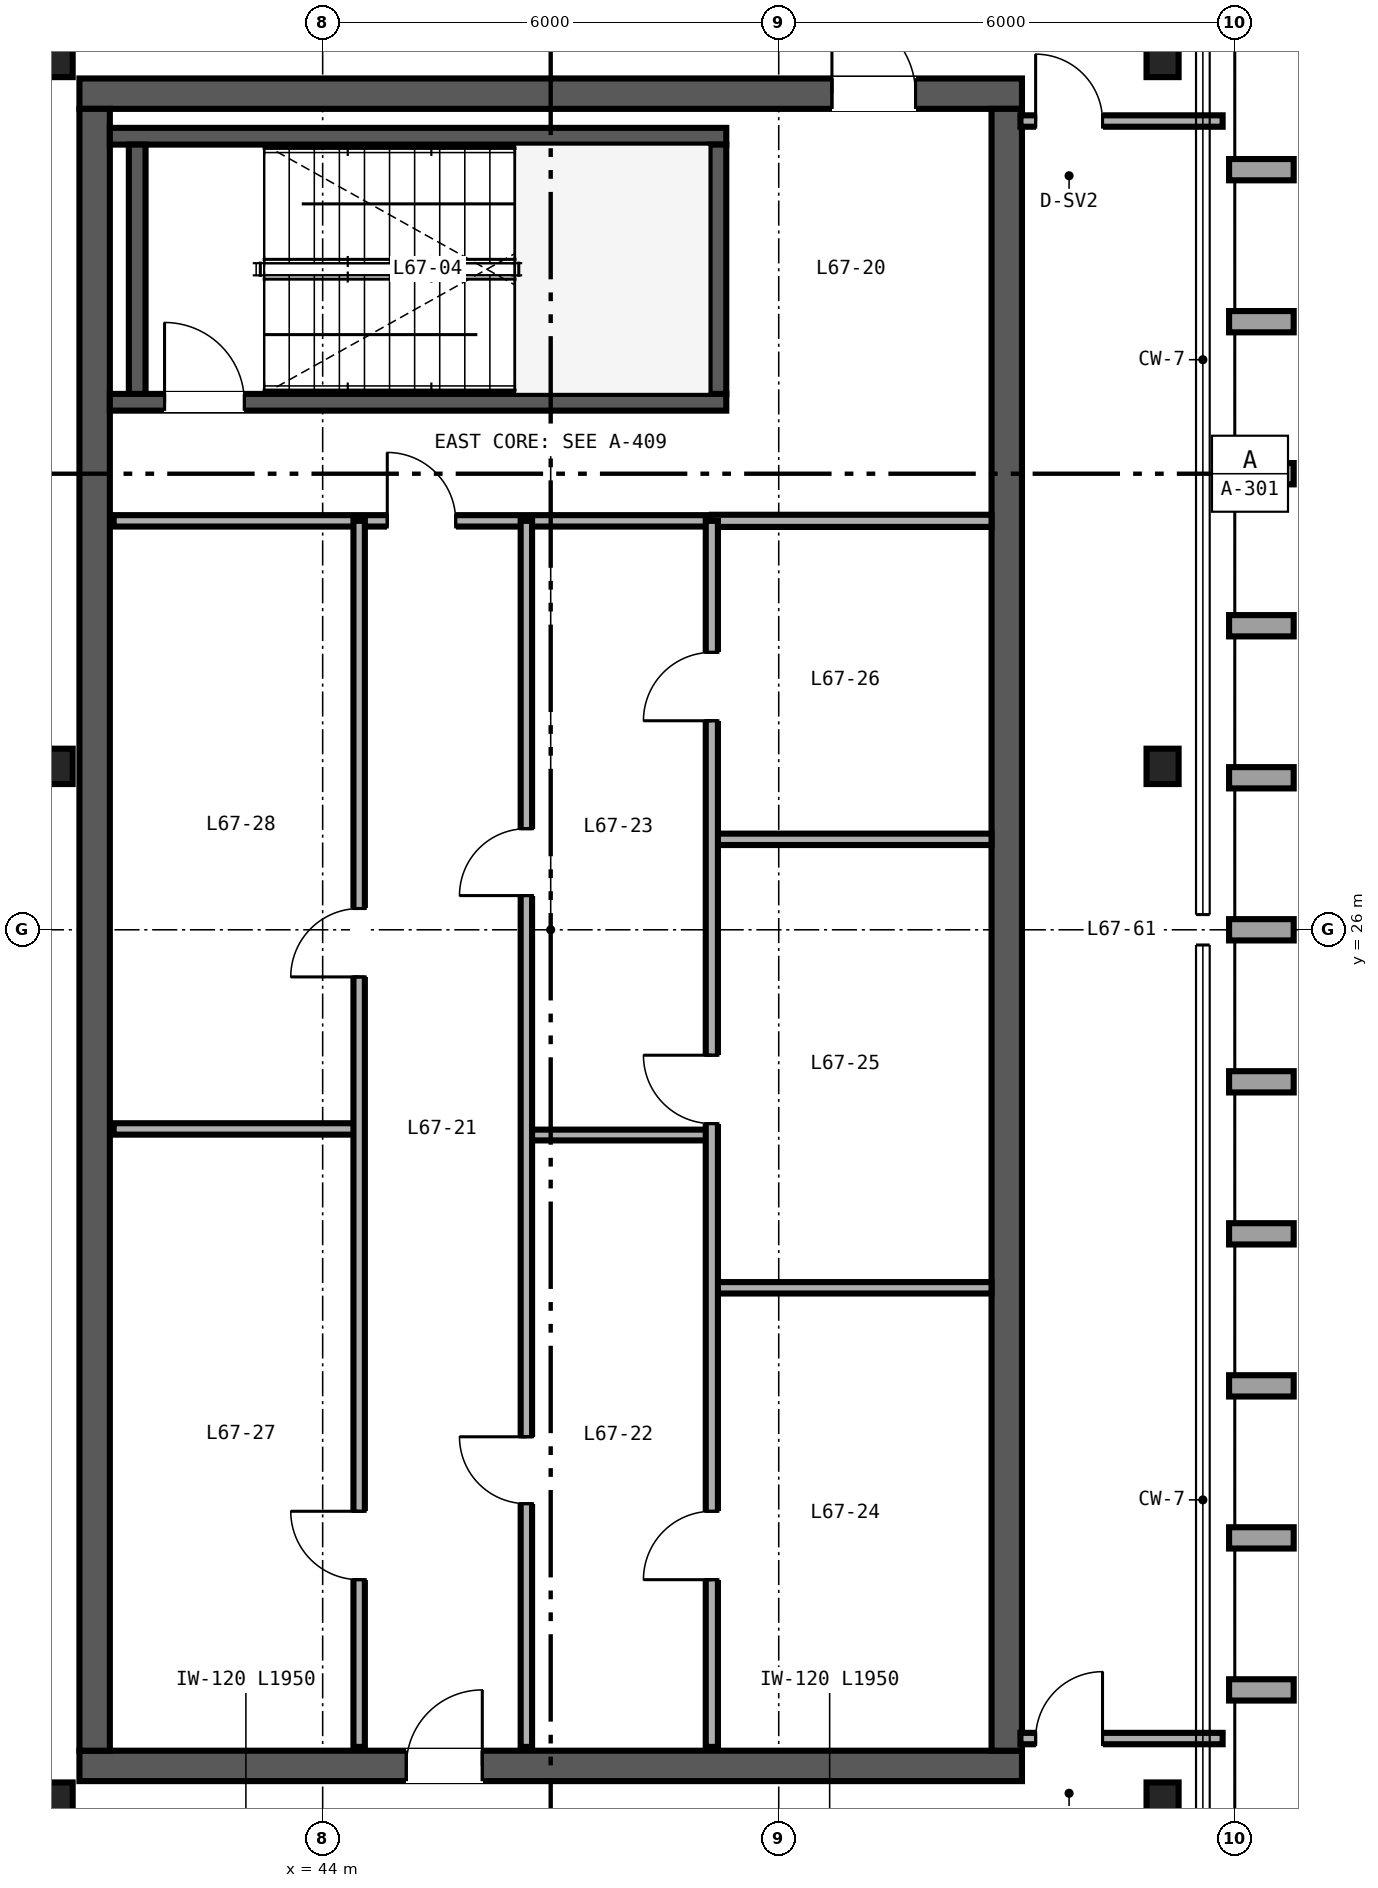
"""IFC4 building model, lengths in metres.
Left out: names, types, materials, properties, quantities, classifications, styles, units other than length and angle.
Written with IfcOpenShell. Run it as: python <this file> out.ifc"""

import sys

from ifc_helpers import new_model, si_unit, direction, frame, frame_2d, origin, origin_2d, place, context, subcontext, project, spatial, rectangle, i_section, extrude, source, transform, mapped, element, fill, save


model = new_model("IFC4")
c1 = context("Model", 3, precision=1e-05, world=origin(), true_north=direction((0.0, 1.0)))
c2 = subcontext(c1, "Body", "Model", "MODEL_VIEW")
j1 = project(units=[si_unit("LENGTHUNIT", "METRE"), si_unit("PLANEANGLEUNIT", "RADIAN")], contexts=[c1])
p1 = place(None, origin())
s1 = spatial("IfcSite", under=j1, at=p1, CompositionType="ELEMENT")
p2 = place(p1, origin())
s2 = spatial("IfcBuilding", under=s1, at=p2, CompositionType="ELEMENT")
p3 = place(p2, frame((0.0, 0.0, 265.2)))
s3 = spatial("IfcBuildingStorey", under=s2, at=p3, CompositionType="ELEMENT", Elevation=265.2)
p4 = place(p3, frame((40.8, 15.0, 0.0), z_axis=(0.0, 0.0, 1.0), x_axis=(1.0, 0.0, 0.0)))
e1 = element("IfcWall", 1, at=p4, inside=s3, PredefinedType="SHEAR", context=c2, shape_type="SweptSolid", body=[
    extrude(rectangle(XDim=12.4, YDim=0.4, at=frame_2d((6.2, 0.0))), origin(), (0.0, 0.0, 1.0), 3.38),
])
p5 = place(p4, frame((4.3, 0.0, 0.0)))
e2 = element("IfcOpeningElement", 2, at=p5, cuts=e1, PredefinedType="OPENING", context=c2, shape_type="SweptSolid", body=[
    extrude(rectangle(XDim=1.0, YDim=2.15, at=frame_2d((0.5, 1.075))), frame((0.0, 0.21, 0.0), z_axis=(0.0, -1.0, 0.0), x_axis=(1.0, 0.0, 0.0)), (0.0, 0.0, 1.0), 0.42),
])
p6 = place(p3, frame((40.8, 37.0, 0.0), z_axis=(0.0, 0.0, 1.0), x_axis=(1.0, 0.0, 0.0)))
e3 = element("IfcWall", 3, at=p6, inside=s3, PredefinedType="SHEAR", context=c2, shape_type="SweptSolid", body=[
    extrude(rectangle(XDim=12.4, YDim=0.4, at=frame_2d((6.2, 0.0))), origin(), (0.0, 0.0, 1.0), 3.38),
])
p7 = place(p6, frame((9.9, 0.0, 0.0)))
e4 = element("IfcOpeningElement", 4, at=p7, cuts=e3, PredefinedType="OPENING", context=c2, shape_type="SweptSolid", body=[
    extrude(rectangle(XDim=1.1, YDim=2.15, at=frame_2d((0.55, 1.075))), frame((0.0, 0.21, 0.0), z_axis=(0.0, -1.0, 0.0), x_axis=(1.0, 0.0, 0.0)), (0.0, 0.0, 1.0), 0.42),
])
for number, where, z_axis, x_axis in (
    (5, (41.0, 15.2, 0.0), (0.0, 0.0, 1.0), (0.0, 1.0, 0.0)),
    (6, (53.0, 15.2, 0.0), (0.0, 0.0, 1.0), (0.0, 1.0, 0.0)),
):
    element("IfcWall", number, at=place(p3, frame(where, z_axis=z_axis, x_axis=x_axis)), inside=s3, PredefinedType="SHEAR", context=c2, shape_type="SweptSolid", body=[
        extrude(rectangle(XDim=21.6, YDim=0.4, at=frame_2d((10.8, 0.0))), origin(), (0.0, 0.0, 1.0), 3.38),
    ])
p8 = place(p3, frame((41.2, 32.94, 0.0), z_axis=(0.0, 0.0, 1.0), x_axis=(1.0, 0.0, 0.0)))
e7 = element("IfcWall", 7, at=p8, inside=s3, PredefinedType="SHEAR", context=c2, shape_type="SweptSolid", body=[
    extrude(rectangle(XDim=8.11, YDim=0.22, at=frame_2d((4.055, 0.0))), origin(), (0.0, 0.0, 1.0), 3.4),
])
p9 = place(p8, frame((0.72, 0.0, 0.0)))
e8 = element("IfcOpeningElement", 8, at=p9, cuts=e7, PredefinedType="OPENING", context=c2, shape_type="SweptSolid", body=[
    extrude(rectangle(XDim=1.05, YDim=2.15, at=frame_2d((0.525, 1.075))), frame((0.0, 0.12, 0.0), z_axis=(0.0, -1.0, 0.0), x_axis=(1.0, 0.0, 0.0)), (0.0, 0.0, 1.0), 0.24),
])
p10 = place(p3, frame((41.2, 36.44, 0.0), z_axis=(0.0, 0.0, 1.0), x_axis=(1.0, 0.0, 0.0)))
e9 = element("IfcWall", 9, at=p10, inside=s3, PredefinedType="SHEAR", context=c2, shape_type="SweptSolid", body=[
    extrude(rectangle(XDim=8.11, YDim=0.22, at=frame_2d((4.055, 0.0))), origin(), (0.0, 0.0, 1.0), 3.4),
])
for number, where, z_axis, x_axis in (
    (10, (41.56, 33.05, 0.0), (0.0, 0.0, 1.0), (0.0, 1.0, 0.0)),
    (11, (49.2, 33.05, 0.0), (0.0, 0.0, 1.0), (0.0, 1.0, 0.0)),
):
    element("IfcWall", number, at=place(p3, frame(where, z_axis=z_axis, x_axis=x_axis)), inside=s3, PredefinedType="SHEAR", context=c2, shape_type="SweptSolid", body=[
        extrude(rectangle(XDim=3.28, YDim=0.22, at=frame_2d((1.64, 0.0))), origin(), (0.0, 0.0, 1.0), 3.4),
    ])
m1 = source(origin(), c2, "Body", "SweptSolid", [
    extrude(i_section(OverallWidth=0.422, OverallDepth=0.465, WebThickness=0.045, FlangeThickness=0.073, FilletRadius=0.025, at=origin_2d()), origin(), (0.0, 0.0, 1.0), 3.38),
])
for number, where, z_axis, x_axis in (
    (12, (40.5, 14.55, 0.0), (0.0, 0.0, 1.0), (1.0, 0.0, 0.0)),
    (13, (55.05, 14.55, 0.0), (0.0, 0.0, 1.0), (1.0, 0.0, 0.0)),
    (14, (40.5, 28.15, 0.0), (0.0, 0.0, 1.0), (1.0, 0.0, 0.0)),
    (15, (55.05, 28.15, 0.0), (0.0, 0.0, 1.0), (1.0, 0.0, 0.0)),
    (16, (40.5, 37.45, 0.0), (0.0, 0.0, 1.0), (1.0, 0.0, 0.0)),
    (17, (55.05, 37.45, 0.0), (0.0, 0.0, 1.0), (1.0, 0.0, 0.0)),
):
    element("IfcColumn", number, at=place(p3, frame(where, z_axis=z_axis, x_axis=x_axis)), inside=s3, PredefinedType="COLUMN", context=c2, shape_type="MappedRepresentation", body=[
        mapped(m1, transform((0.0, 0.0, 0.0), scale=1.0)),
    ])
p11 = place(p3, frame((41.25, 31.38, 0.0), z_axis=(0.0, 0.0, 1.0), x_axis=(1.0, 0.0, 0.0)))
e18 = element("IfcWall", 18, at=p11, inside=s3, PredefinedType="PARTITIONING", context=c2, shape_type="SweptSolid", body=[
    extrude(rectangle(XDim=7.87, YDim=0.15, at=frame_2d((3.935, 0.0))), origin(), (0.0, 0.0, 1.0), 2.48),
])
p12 = place(p11, frame((3.6, 0.0, 0.0)))
e19 = element("IfcOpeningElement", 19, at=p12, cuts=e18, PredefinedType="OPENING", context=c2, shape_type="SweptSolid", body=[
    extrude(rectangle(XDim=0.9, YDim=2.15, at=frame_2d((0.45, 1.075))), frame((0.0, 0.085, 0.0), z_axis=(0.0, -1.0, 0.0), x_axis=(1.0, 0.0, 0.0)), (0.0, 0.0, 1.0), 0.17),
])
p13 = place(p3, frame((46.68, 23.3, 0.0), z_axis=(0.0, 0.0, 1.0), x_axis=(1.0, 0.0, 0.0)))
e20 = element("IfcWall", 20, at=p13, inside=s3, PredefinedType="PARTITIONING", context=c2, shape_type="SweptSolid", body=[
    extrude(rectangle(XDim=2.44, YDim=0.142, at=frame_2d((1.22, 0.0))), origin(), (0.0, 0.0, 1.0), 3.38),
])
p14 = place(p3, frame((46.68, 15.25, 0.0), z_axis=(0.0, 0.0, 1.0), x_axis=(0.0, 1.0, 0.0)))
e21 = element("IfcWall", 21, at=p14, inside=s3, PredefinedType="PARTITIONING", context=c2, shape_type="SweptSolid", body=[
    extrude(rectangle(XDim=16.13, YDim=0.15, at=frame_2d((8.065, 0.0))), origin(), (0.0, 0.0, 1.0), 2.453),
])
p15 = place(p14, frame((3.2, 0.0, 0.0)))
e22 = element("IfcOpeningElement", 22, at=p15, cuts=e21, PredefinedType="OPENING", context=c2, shape_type="SweptSolid", body=[
    extrude(rectangle(XDim=0.88, YDim=2.15, at=frame_2d((0.44, 1.075))), frame((0.0, 0.085, 0.0), z_axis=(0.0, -1.0, 0.0), x_axis=(1.0, 0.0, 0.0)), (0.0, 0.0, 1.0), 0.17),
])
p16 = place(p14, frame((11.2, 0.0, 0.0)))
e23 = element("IfcOpeningElement", 23, at=p16, cuts=e21, PredefinedType="OPENING", context=c2, shape_type="SweptSolid", body=[
    extrude(rectangle(XDim=0.88, YDim=2.15, at=frame_2d((0.44, 1.075))), frame((0.0, 0.085, 0.0), z_axis=(0.0, -1.0, 0.0), x_axis=(1.0, 0.0, 0.0)), (0.0, 0.0, 1.0), 0.17),
])
p17 = place(p3, frame((49.12, 31.38, 0.0), z_axis=(0.0, 0.0, 1.0), x_axis=(1.0, 0.0, 0.0)))
e24 = element("IfcWall", 24, at=p17, inside=s3, PredefinedType="PARTITIONING", context=c2, shape_type="SweptSolid", body=[
    extrude(rectangle(XDim=3.68, YDim=0.16, at=frame_2d((1.84, 0.0))), origin(), (0.0, 0.0, 1.0), 2.48),
])
for number, where, z_axis, x_axis in (
    (25, (49.12, 21.29, 0.0), (0.0, 0.0, 1.0), (1.0, 0.0, 0.0)),
    (26, (49.12, 27.19, 0.0), (0.0, 0.0, 1.0), (1.0, 0.0, 0.0)),
):
    element("IfcWall", number, at=place(p3, frame(where, z_axis=z_axis, x_axis=x_axis)), inside=s3, PredefinedType="PARTITIONING", context=c2, shape_type="SweptSolid", body=[
        extrude(rectangle(XDim=3.68, YDim=0.15, at=frame_2d((1.84, 0.0))), origin(), (0.0, 0.0, 1.0), 3.38),
    ])
p18 = place(p3, frame((49.12, 15.25, 0.0), z_axis=(0.0, 0.0, 1.0), x_axis=(0.0, 1.0, 0.0)))
e27 = element("IfcWall", 27, at=p18, inside=s3, PredefinedType="PARTITIONING", context=c2, shape_type="SweptSolid", body=[
    extrude(rectangle(XDim=16.13, YDim=0.16, at=frame_2d((8.065, 0.0))), origin(), (0.0, 0.0, 1.0), 2.453),
])
p19 = place(p18, frame((2.2, 0.0, 0.0)))
e28 = element("IfcOpeningElement", 28, at=p19, cuts=e27, PredefinedType="OPENING", context=c2, shape_type="SweptSolid", body=[
    extrude(rectangle(XDim=0.9, YDim=2.15, at=frame_2d((0.45, 1.075))), frame((0.0, 0.09, 0.0), z_axis=(0.0, -1.0, 0.0), x_axis=(1.0, 0.0, 0.0)), (0.0, 0.0, 1.0), 0.18),
])
p20 = place(p18, frame((8.2, 0.0, 0.0)))
e29 = element("IfcOpeningElement", 29, at=p20, cuts=e27, PredefinedType="OPENING", context=c2, shape_type="SweptSolid", body=[
    extrude(rectangle(XDim=0.9, YDim=2.15, at=frame_2d((0.45, 1.075))), frame((0.0, 0.09, 0.0), z_axis=(0.0, -1.0, 0.0), x_axis=(1.0, 0.0, 0.0)), (0.0, 0.0, 1.0), 0.18),
])
p21 = place(p18, frame((13.5, 0.0, 0.0)))
e30 = element("IfcOpeningElement", 30, at=p21, cuts=e27, PredefinedType="OPENING", context=c2, shape_type="SweptSolid", body=[
    extrude(rectangle(XDim=0.9, YDim=2.15, at=frame_2d((0.45, 1.075))), frame((0.0, 0.09, 0.0), z_axis=(0.0, -1.0, 0.0), x_axis=(1.0, 0.0, 0.0)), (0.0, 0.0, 1.0), 0.18),
])
p22 = place(p3, frame((41.25, 23.38, 0.0), z_axis=(0.0, 0.0, 1.0), x_axis=(1.0, 0.0, 0.0)))
e31 = element("IfcWall", 31, at=p22, inside=s3, PredefinedType="PARTITIONING", context=c2, shape_type="SweptSolid", body=[
    extrude(rectangle(XDim=3.23, YDim=0.15, at=frame_2d((1.615, 0.0))), origin(), (0.0, 0.0, 1.0), 3.38),
])
p23 = place(p3, frame((44.48, 15.25, 0.0), z_axis=(0.0, 0.0, 1.0), x_axis=(0.0, 1.0, 0.0)))
e32 = element("IfcWall", 32, at=p23, inside=s3, PredefinedType="PARTITIONING", context=c2, shape_type="SweptSolid", body=[
    extrude(rectangle(XDim=16.13, YDim=0.15, at=frame_2d((8.065, 0.0))), origin(), (0.0, 0.0, 1.0), 2.453),
])
p24 = place(p23, frame((2.2, 0.0, 0.0)))
e33 = element("IfcOpeningElement", 33, at=p24, cuts=e32, PredefinedType="OPENING", context=c2, shape_type="SweptSolid", body=[
    extrude(rectangle(XDim=0.9, YDim=2.15, at=frame_2d((0.45, 1.075))), frame((0.0, 0.085, 0.0), z_axis=(0.0, -1.0, 0.0), x_axis=(1.0, 0.0, 0.0)), (0.0, 0.0, 1.0), 0.17),
])
p25 = place(p23, frame((10.13, 0.0, 0.0)))
e34 = element("IfcOpeningElement", 34, at=p25, cuts=e32, PredefinedType="OPENING", context=c2, shape_type="SweptSolid", body=[
    extrude(rectangle(XDim=0.9, YDim=2.15, at=frame_2d((0.45, 1.075))), frame((0.0, 0.085, 0.0), z_axis=(0.0, -1.0, 0.0), x_axis=(1.0, 0.0, 0.0)), (0.0, 0.0, 1.0), 0.17),
])
p26 = place(p3, frame((53.18, 15.36, 0.0), z_axis=(0.0, 0.0, 1.0), x_axis=(1.0, 0.0, 0.0)))
e35 = element("IfcWall", 35, at=p26, inside=s3, PredefinedType="PARTITIONING", context=c2, shape_type="SweptSolid", body=[
    extrude(rectangle(XDim=2.66, YDim=0.15, at=frame_2d((1.33, 0.0))), origin(), (0.0, 0.0, 1.0), 2.601),
])
p27 = place(p26, frame((0.2, 0.0, 0.0)))
e36 = element("IfcOpeningElement", 36, at=p27, cuts=e35, PredefinedType="OPENING", context=c2, shape_type="SweptSolid", body=[
    extrude(rectangle(XDim=0.88, YDim=2.15, at=frame_2d((0.44, 1.075))), frame((0.0, 0.085, 0.0), z_axis=(0.0, -1.0, 0.0), x_axis=(1.0, 0.0, 0.0)), (0.0, 0.0, 1.0), 0.17),
])
p28 = place(p3, frame((53.18, 36.64, 0.0), z_axis=(0.0, 0.0, 1.0), x_axis=(1.0, 0.0, 0.0)))
e37 = element("IfcWall", 37, at=p28, inside=s3, PredefinedType="PARTITIONING", context=c2, shape_type="SweptSolid", body=[
    extrude(rectangle(XDim=2.66, YDim=0.15, at=frame_2d((1.33, 0.0))), origin(), (0.0, 0.0, 1.0), 2.763),
])
p29 = place(p28, frame((0.2, 0.0, 0.0)))
e38 = element("IfcOpeningElement", 38, at=p29, cuts=e37, PredefinedType="OPENING", context=c2, shape_type="SweptSolid", body=[
    extrude(rectangle(XDim=0.88, YDim=2.15, at=frame_2d((0.44, 1.075))), frame((0.0, 0.085, 0.0), z_axis=(0.0, -1.0, 0.0), x_axis=(1.0, 0.0, 0.0)), (0.0, 0.0, 1.0), 0.17),
])
m2 = source(origin(), c2, "Body", "SweptSolid", [
    extrude(rectangle(XDim=1.05, YDim=2.15, at=frame_2d((0.525, 1.075))), frame((0.0, 0.025, 0.0), z_axis=(0.0, -1.0, 0.0), x_axis=(1.0, 0.0, 0.0)), (0.0, 0.0, 1.0), 0.05),
])
p30 = place(p9, origin())
e39 = element("IfcDoor", 39, at=p30, inside=s3, OperationType="SINGLE_SWING_LEFT", PredefinedType="DOOR", context=c2, shape_type="MappedRepresentation", body=[
    mapped(m2, transform((0.0, 0.0, 0.0), scale=1.0)),
])
fill(e8, e39)
m3 = source(origin(), c2, "Body", "SweptSolid", [
    extrude(rectangle(XDim=0.88, YDim=2.15, at=frame_2d((0.44, 1.075))), frame((0.0, 0.025, 0.0), z_axis=(0.0, -1.0, 0.0), x_axis=(1.0, 0.0, 0.0)), (0.0, 0.0, 1.0), 0.05),
])
p31 = place(p15, origin())
e40 = element("IfcDoor", 40, at=p31, inside=s3, OperationType="SINGLE_SWING_RIGHT", PredefinedType="DOOR", context=c2, shape_type="MappedRepresentation", body=[
    mapped(m3, transform((0.0, 0.0, 0.0), scale=1.0)),
])
fill(e22, e40)
p32 = place(p16, origin())
e41 = element("IfcDoor", 41, at=p32, inside=s3, OperationType="SINGLE_SWING_LEFT", PredefinedType="DOOR", context=c2, shape_type="MappedRepresentation", body=[
    mapped(m3, transform((0.0, 0.0, 0.0), scale=1.0)),
])
fill(e23, e41)
m4 = source(origin(), c2, "Body", "SweptSolid", [
    extrude(rectangle(XDim=0.9, YDim=2.15, at=frame_2d((0.45, 1.075))), frame((0.0, 0.025, 0.0), z_axis=(0.0, -1.0, 0.0), x_axis=(1.0, 0.0, 0.0)), (0.0, 0.0, 1.0), 0.05),
])
p33 = place(p12, origin())
e42 = element("IfcDoor", 42, at=p33, inside=s3, OperationType="SINGLE_SWING_LEFT", PredefinedType="DOOR", context=c2, shape_type="MappedRepresentation", body=[
    mapped(m4, transform((0.0, 0.0, 0.0), scale=1.0)),
])
fill(e19, e42)
m5 = source(origin(), c2, "Body", "SweptSolid", [
    extrude(rectangle(XDim=1.0, YDim=2.15, at=frame_2d((0.5, 1.075))), frame((0.0, 0.025, 0.0), z_axis=(0.0, -1.0, 0.0), x_axis=(1.0, 0.0, 0.0)), (0.0, 0.0, 1.0), 0.05),
])
p34 = place(p5, origin())
e43 = element("IfcDoor", 43, at=p34, inside=s3, OperationType="SINGLE_SWING_RIGHT", PredefinedType="DOOR", context=c2, shape_type="MappedRepresentation", body=[
    mapped(m5, transform((0.0, 0.0, 0.0), scale=1.0)),
])
fill(e2, e43)
m6 = source(origin(), c2, "Body", "SweptSolid", [
    extrude(rectangle(XDim=1.1, YDim=2.15, at=frame_2d((0.55, 1.075))), frame((0.0, 0.025, 0.0), z_axis=(0.0, -1.0, 0.0), x_axis=(1.0, 0.0, 0.0)), (0.0, 0.0, 1.0), 0.05),
])
p35 = place(p7, origin())
e44 = element("IfcDoor", 44, at=p35, inside=s3, OperationType="SINGLE_SWING_LEFT", PredefinedType="DOOR", context=c2, shape_type="MappedRepresentation", body=[
    mapped(m6, transform((0.0, 0.0, 0.0), scale=1.0)),
])
fill(e4, e44)
p36 = place(p19, origin())
e45 = element("IfcDoor", 45, at=p36, inside=s3, OperationType="SINGLE_SWING_LEFT", PredefinedType="DOOR", context=c2, shape_type="MappedRepresentation", body=[
    mapped(m4, transform((0.0, 0.0, 0.0), scale=1.0)),
])
fill(e28, e45)
p37 = place(p20, origin())
e46 = element("IfcDoor", 46, at=p37, inside=s3, OperationType="SINGLE_SWING_RIGHT", PredefinedType="DOOR", context=c2, shape_type="MappedRepresentation", body=[
    mapped(m4, transform((0.0, 0.0, 0.0), scale=1.0)),
])
fill(e29, e46)
p38 = place(p21, origin())
e47 = element("IfcDoor", 47, at=p38, inside=s3, OperationType="SINGLE_SWING_LEFT", PredefinedType="DOOR", context=c2, shape_type="MappedRepresentation", body=[
    mapped(m4, transform((0.0, 0.0, 0.0), scale=1.0)),
])
fill(e30, e47)
p39 = place(p24, origin())
e48 = element("IfcDoor", 48, at=p39, inside=s3, OperationType="SINGLE_SWING_RIGHT", PredefinedType="DOOR", context=c2, shape_type="MappedRepresentation", body=[
    mapped(m4, transform((0.0, 0.0, 0.0), scale=1.0)),
])
fill(e33, e48)
p40 = place(p25, origin())
e49 = element("IfcDoor", 49, at=p40, inside=s3, OperationType="SINGLE_SWING_LEFT", PredefinedType="DOOR", context=c2, shape_type="MappedRepresentation", body=[
    mapped(m4, transform((0.0, 0.0, 0.0), scale=1.0)),
])
fill(e34, e49)
p41 = place(p27, origin())
e50 = element("IfcDoor", 50, at=p41, inside=s3, OperationType="SINGLE_SWING_RIGHT", PredefinedType="DOOR", context=c2, shape_type="MappedRepresentation", body=[
    mapped(m3, transform((0.0, 0.0, 0.0), scale=1.0)),
])
fill(e36, e50)
p42 = place(p29, origin())
e51 = element("IfcDoor", 51, at=p42, inside=s3, OperationType="SINGLE_SWING_LEFT", PredefinedType="DOOR", context=c2, shape_type="MappedRepresentation", body=[
    mapped(m3, transform((0.0, 0.0, 0.0), scale=1.0)),
])
fill(e38, e51)
save(model, sys.argv[1])
